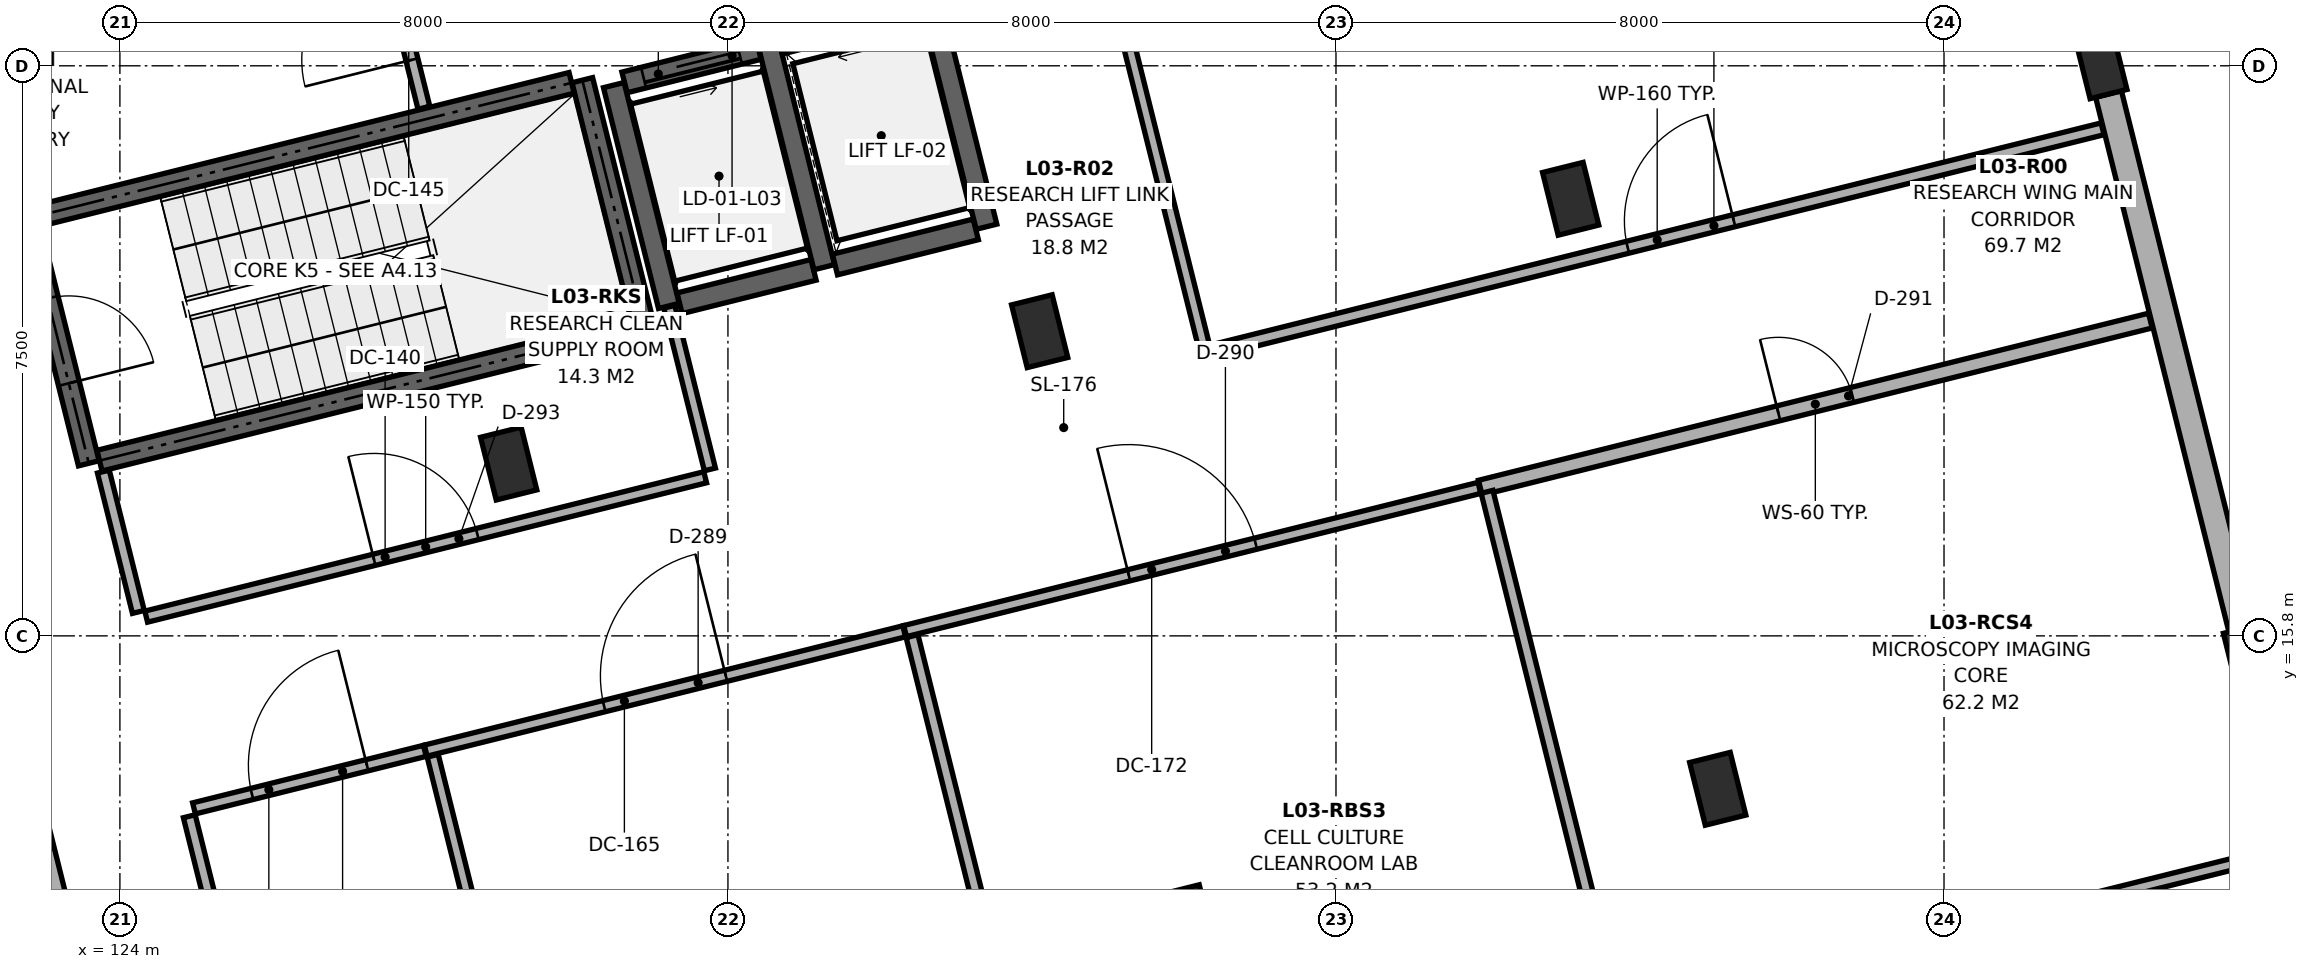
"""IFC4 building model, lengths in metres.
Left out: names, types, materials, properties, quantities, classifications, styles, units other than length and angle.
Written with IfcOpenShell. Run it as: python <this file> out.ifc"""

import sys

from ifc_helpers import new_model, si_unit, direction, frame, frame_2d, origin, origin_2d, place, context, subcontext, project, spatial, rectangle, extrude, element, fill, save


model = new_model("IFC4")
c1 = context("Model", 3, precision=1e-05, world=origin(), true_north=direction((0.0, 1.0)))
c2 = subcontext(c1, "Body", "Model", "MODEL_VIEW")
j1 = project(units=[si_unit("LENGTHUNIT", "METRE"), si_unit("PLANEANGLEUNIT", "RADIAN")], contexts=[c1])
p1 = place(None, origin())
s1 = spatial("IfcSite", under=j1, at=p1, CompositionType="ELEMENT")
p2 = place(p1, origin())
s2 = spatial("IfcBuilding", under=s1, at=p2, CompositionType="ELEMENT")
p3 = place(p2, frame((0.0, 0.0, 13.5)))
s3 = spatial("IfcBuildingStorey", under=s2, at=p3, CompositionType="ELEMENT", Elevation=13.5)
for number, where, z_axis, x_axis in (
    (1, (129.115, 18.067, 0.0), (0.0, 0.0, 1.0), (0.97, 0.242, 0.0)),
    (2, (138.037, 12.046, 0.0), (0.0, 0.0, 1.0), (0.97, 0.242, 0.0)),
    (3, (136.102, 19.808, 0.0), (0.0, 0.0, 1.0), (0.97, 0.242, 0.0)),
    (4, (145.023, 13.788, 0.0), (0.0, 0.0, 1.0), (0.97, 0.242, 0.0)),
    (5, (143.088, 21.55, 0.0), (0.0, 0.0, 1.0), (0.97, 0.242, 0.0)),
):
    element("IfcColumn", number, at=place(p3, frame(where, z_axis=z_axis, x_axis=x_axis)), inside=s3, PredefinedType="COLUMN", context=c2, shape_type="SweptSolid", body=[
        extrude(rectangle(XDim=0.55, YDim=0.85, at=origin_2d()), origin(), (0.0, 0.0, 1.0), 3.72),
    ])
for number, where, z_axis, x_axis in (
    (6, (152.009, 15.53, 0.0), (0.0, 0.0, 1.0), (0.97, 0.242, 0.0)),
    (7, (150.074, 23.292, 0.0), (0.0, 0.0, 1.0), (0.97, 0.242, 0.0)),
):
    element("IfcColumn", number, at=place(p3, frame(where, z_axis=z_axis, x_axis=x_axis)), inside=s3, PredefinedType="COLUMN", context=c2, shape_type="SweptSolid", body=[
        extrude(rectangle(XDim=0.5, YDim=0.75, at=origin_2d()), origin(), (0.0, 0.0, 1.0), 3.75),
    ])
p4 = place(p3, frame((150.165, 22.928, 0.0), z_axis=(0.0, 0.0, 1.0), x_axis=(0.241917549853, -0.970296809782, 0.0)))
e8 = element("IfcWall", 8, at=p4, inside=s3, PredefinedType="SOLIDWALL", context=c2, shape_type="SweptSolid", body=[
    extrude(rectangle(XDim=7.25, YDim=0.35, at=frame_2d((3.625, 0.0))), origin(), (0.0, 0.0, 1.0), 3.005),
])
p5 = place(p3, frame((123.962, 8.975, 0.0), z_axis=(0.0, 0.0, 1.0), x_axis=(-0.241924964772, 0.97029496104, 0.0)))
e9 = element("IfcWall", 9, at=p5, inside=s3, PredefinedType="SOLIDWALL", context=c2, shape_type="SweptSolid", body=[
    extrude(rectangle(XDim=7.15, YDim=0.35, at=frame_2d((3.575, 0.0))), origin(), (0.0, 0.0, 1.0), 3.005),
])
p6 = place(p3, frame((123.731, 18.105, 0.0), z_axis=(0.0, 0.0, 1.0), x_axis=(0.970297238923, 0.241915828623, 0.0)))
e10 = element("IfcWall", 10, at=p6, inside=s3, PredefinedType="SHEAR", context=c2, shape_type="SweptSolid", body=[
    extrude(rectangle(XDim=7.23, YDim=0.28, at=frame_2d((3.615, 0.0))), origin(), (0.0, 0.0, 1.0), 3.72),
])
p7 = place(p3, frame((130.887, 19.889, 0.0), z_axis=(0.0, 0.0, 1.0), x_axis=(-0.241947258837, 0.970289402158, 0.0)))
e11 = element("IfcWall", 11, at=p7, inside=s3, PredefinedType="SHEAR", context=c2, shape_type="SweptSolid", body=[
    extrude(rectangle(XDim=3.32, YDim=0.28, at=frame_2d((1.66, 0.0))), origin(), (0.0, 0.0, 1.0), 3.72),
])
p8 = place(p3, frame((129.943, 23.076, 0.0), z_axis=(0.0, 0.0, 1.0), x_axis=(-0.970289312034, -0.241947620266, 0.0)))
e12 = element("IfcWall", 12, at=p8, inside=s3, PredefinedType="SHEAR", context=c2, shape_type="SweptSolid", body=[
    extrude(rectangle(XDim=7.23, YDim=0.28, at=frame_2d((3.615, 0.0))), origin(), (0.0, 0.0, 1.0), 3.72),
])
p9 = place(p3, frame((122.787, 21.292, 0.0), z_axis=(0.0, 0.0, 1.0), x_axis=(0.241860763027, -0.970310966293, 0.0)))
e13 = element("IfcWall", 13, at=p9, inside=s3, PredefinedType="SHEAR", context=c2, shape_type="SweptSolid", body=[
    extrude(rectangle(XDim=3.32, YDim=0.28, at=frame_2d((1.66, 0.0))), origin(), (0.0, 0.0, 1.0), 3.72),
])
p10 = place(p9, frame((1.085, 0.0, 0.0)))
e14 = element("IfcOpeningElement", 14, at=p10, cuts=e13, PredefinedType="OPENING", context=c2, shape_type="SweptSolid", body=[
    extrude(rectangle(XDim=1.15, YDim=2.15, at=frame_2d((0.575, 1.075))), frame((0.0, 0.152, 0.0), z_axis=(0.0, -1.0, 0.0), x_axis=(1.0, 0.0, 0.0)), (0.0, 0.0, 1.0), 0.304),
])
p11 = place(p3, frame((131.363, 20.176, 0.0), z_axis=(0.0, 0.0, 1.0), x_axis=(0.970284587517, 0.241966566341, 0.0)))
e15 = element("IfcWall", 15, at=p11, inside=s3, PredefinedType="SHEAR", context=c2, shape_type="SweptSolid", body=[
    extrude(rectangle(XDim=1.817, YDim=0.28, at=frame_2d((0.909, 0.0))), origin(), (0.0, 0.0, 1.0), 3.72),
])
p12 = place(p3, frame((133.267, 20.651, 0.0), z_axis=(0.0, 0.0, 1.0), x_axis=(-0.241921647353, 0.970295788171, 0.0)))
e16 = element("IfcWall", 16, at=p12, inside=s3, PredefinedType="SHEAR", context=c2, shape_type="SweptSolid", body=[
    extrude(rectangle(XDim=2.994, YDim=0.28, at=frame_2d((1.497, 0.0))), origin(), (0.0, 0.0, 1.0), 3.72),
])
p13 = place(p3, frame((132.402, 23.521, 0.0), z_axis=(0.0, 0.0, 1.0), x_axis=(-0.970284587517, -0.241966566341, 0.0)))
e17 = element("IfcWall", 17, at=p13, inside=s3, PredefinedType="SHEAR", context=c2, shape_type="SweptSolid", body=[
    extrude(rectangle(XDim=1.817, YDim=0.28, at=frame_2d((0.909, 0.0))), origin(), (0.0, 0.0, 1.0), 3.72),
])
p14 = place(p13, frame((0.259, 0.0, 0.0)))
e18 = element("IfcOpeningElement", 18, at=p14, cuts=e17, PredefinedType="OPENING", context=c2, shape_type="SweptSolid", body=[
    extrude(rectangle(XDim=1.3, YDim=2.2, at=frame_2d((0.65, 1.1))), frame((0.0, 0.152, 0.0), z_axis=(0.0, -1.0, 0.0), x_axis=(1.0, 0.0, 0.0)), (0.0, 0.0, 1.0), 0.304),
])
p15 = place(p3, frame((130.498, 23.046, 0.0), z_axis=(0.0, 0.0, 1.0), x_axis=(0.241921647353, -0.970295788171, 0.0)))
e19 = element("IfcWall", 19, at=p15, inside=s3, PredefinedType="SHEAR", context=c2, shape_type="SweptSolid", body=[
    extrude(rectangle(XDim=2.994, YDim=0.28, at=frame_2d((1.497, 0.0))), origin(), (0.0, 0.0, 1.0), 3.72),
])
p16 = place(p3, frame((133.408, 20.686, 0.0), z_axis=(0.0, 0.0, 1.0), x_axis=(0.970285190026, 0.241964150272, 0.0)))
e20 = element("IfcWall", 20, at=p16, inside=s3, PredefinedType="SHEAR", context=c2, shape_type="SweptSolid", body=[
    extrude(rectangle(XDim=1.91, YDim=0.28, at=frame_2d((0.955, 0.0))), origin(), (0.0, 0.0, 1.0), 3.72),
])
p17 = place(p3, frame((135.402, 21.183, 0.0), z_axis=(0.0, 0.0, 1.0), x_axis=(-0.241921647353, 0.970295788171, 0.0)))
e21 = element("IfcWall", 21, at=p17, inside=s3, PredefinedType="SHEAR", context=c2, shape_type="SweptSolid", body=[
    extrude(rectangle(XDim=2.994, YDim=0.28, at=frame_2d((1.497, 0.0))), origin(), (0.0, 0.0, 1.0), 3.72),
])
p18 = place(p3, frame((134.537, 24.053, 0.0), z_axis=(0.0, 0.0, 1.0), x_axis=(-0.970285190026, -0.241964150272, 0.0)))
e22 = element("IfcWall", 22, at=p18, inside=s3, PredefinedType="SHEAR", context=c2, shape_type="SweptSolid", body=[
    extrude(rectangle(XDim=1.91, YDim=0.28, at=frame_2d((0.955, 0.0))), origin(), (0.0, 0.0, 1.0), 3.72),
])
p19 = place(p18, frame((0.305, 0.0, 0.0)))
e23 = element("IfcOpeningElement", 23, at=p19, cuts=e22, PredefinedType="OPENING", context=c2, shape_type="SweptSolid", body=[
    extrude(rectangle(XDim=1.3, YDim=2.2, at=frame_2d((0.65, 1.1))), frame((0.0, 0.152, 0.0), z_axis=(0.0, -1.0, 0.0), x_axis=(1.0, 0.0, 0.0)), (0.0, 0.0, 1.0), 0.304),
])
p20 = place(p3, frame((124.346, 16.053, 0.0), z_axis=(0.0, 0.0, 1.0), x_axis=(0.970295772287, 0.241921711059, 0.0)))
e24 = element("IfcWall", 24, at=p20, inside=s3, PredefinedType="PARTITIONING", context=c2, shape_type="SweptSolid", body=[
    extrude(rectangle(XDim=7.58, YDim=0.15, at=frame_2d((3.79, 0.0))), origin(), (0.0, 0.0, 1.0), 2.905),
])
p21 = place(p20, frame((3.09, 0.0, 0.0)))
e25 = element("IfcOpeningElement", 25, at=p21, cuts=e24, PredefinedType="OPENING", context=c2, shape_type="SweptSolid", body=[
    extrude(rectangle(XDim=1.4, YDim=2.25, at=frame_2d((0.7, 1.125))), frame((0.0, 0.087, 0.0), z_axis=(0.0, -1.0, 0.0), x_axis=(1.0, 0.0, 0.0)), (0.0, 0.0, 1.0), 0.174),
])
p22 = place(p3, frame((128.0, 22.748, 0.0), z_axis=(0.0, 0.0, 1.0), x_axis=(-0.241929995817, 0.970293706629, 0.0)))
e26 = element("IfcWall", 26, at=p22, inside=s3, PredefinedType="PARTITIONING", context=c2, shape_type="SweptSolid", body=[
    extrude(rectangle(XDim=2.751, YDim=0.16, at=frame_2d((1.375, 0.0))), origin(), (0.0, 0.0, 1.0), 3.7),
])
p23 = place(p22, frame((0.65, 0.0, 0.0)))
e27 = element("IfcOpeningElement", 27, at=p23, cuts=e26, PredefinedType="OPENING", context=c2, shape_type="SweptSolid", body=[
    extrude(rectangle(XDim=1.45, YDim=2.26, at=frame_2d((0.725, 1.13))), frame((0.0, 0.092, 0.0), z_axis=(0.0, -1.0, 0.0), x_axis=(1.0, 0.0, 0.0)), (0.0, 0.0, 1.0), 0.184),
])
p24 = place(p3, frame((124.975, 13.53, 0.0), z_axis=(0.0, 0.0, 1.0), x_axis=(0.970289141252, 0.241948305158, 0.0)))
e28 = element("IfcWall", 28, at=p24, inside=s3, PredefinedType="PARTITIONING", context=c2, shape_type="SweptSolid", body=[
    extrude(rectangle(XDim=3.13, YDim=0.15, at=frame_2d((1.565, 0.0))), origin(), (0.0, 0.0, 1.0), 3.7),
])
p25 = place(p24, frame((0.785, 0.0, 0.0)))
e29 = element("IfcOpeningElement", 29, at=p25, cuts=e28, PredefinedType="OPENING", context=c2, shape_type="SweptSolid", body=[
    extrude(rectangle(XDim=1.56, YDim=2.3, at=frame_2d((0.78, 1.15))), frame((0.0, 0.087, 0.0), z_axis=(0.0, -1.0, 0.0), x_axis=(1.0, 0.0, 0.0)), (0.0, 0.0, 1.0), 0.174),
])
p26 = place(p3, frame((128.023, 14.29, 0.0), z_axis=(0.0, 0.0, 1.0), x_axis=(0.970297244456, 0.24191580643, 0.0)))
e30 = element("IfcWall", 30, at=p26, inside=s3, PredefinedType="PARTITIONING", context=c2, shape_type="SweptSolid", body=[
    extrude(rectangle(XDim=6.488, YDim=0.15, at=frame_2d((3.244, 0.0))), origin(), (0.0, 0.0, 1.0), 2.905),
])
p27 = place(p26, frame((2.419, 0.0, 0.0)))
e31 = element("IfcOpeningElement", 31, at=p27, cuts=e30, PredefinedType="OPENING", context=c2, shape_type="SweptSolid", body=[
    extrude(rectangle(XDim=1.65, YDim=2.32, at=frame_2d((0.825, 1.16))), frame((0.0, 0.087, 0.0), z_axis=(0.0, -1.0, 0.0), x_axis=(1.0, 0.0, 0.0)), (0.0, 0.0, 1.0), 0.174),
])
p28 = place(p3, frame((134.33, 15.863, 0.0), z_axis=(0.0, 0.0, 1.0), x_axis=(0.970299035042, 0.241908624476, 0.0)))
e32 = element("IfcWall", 32, at=p28, inside=s3, PredefinedType="PARTITIONING", context=c2, shape_type="SweptSolid", body=[
    extrude(rectangle(XDim=7.788, YDim=0.15, at=frame_2d((3.894, 0.0))), origin(), (0.0, 0.0, 1.0), 2.905),
])
p29 = place(p28, frame((3.034, 0.0, 0.0)))
e33 = element("IfcOpeningElement", 33, at=p29, cuts=e32, PredefinedType="OPENING", context=c2, shape_type="SweptSolid", body=[
    extrude(rectangle(XDim=1.72, YDim=2.34, at=frame_2d((0.86, 1.17))), frame((0.0, 0.087, 0.0), z_axis=(0.0, -1.0, 0.0), x_axis=(1.0, 0.0, 0.0)), (0.0, 0.0, 1.0), 0.174),
])
p30 = place(p3, frame((141.899, 17.75, 0.0), z_axis=(0.0, 0.0, 1.0), x_axis=(0.970298775858, 0.241909664065, 0.0)))
e34 = element("IfcWall", 34, at=p30, inside=s3, PredefinedType="PARTITIONING", context=c2, shape_type="SweptSolid", body=[
    extrude(rectangle(XDim=9.086, YDim=0.2, at=frame_2d((4.543, 0.0))), origin(), (0.0, 0.0, 1.0), 2.905),
])
p31 = place(p30, frame((4.043, 0.0, 0.0)))
e35 = element("IfcOpeningElement", 35, at=p31, cuts=e34, PredefinedType="OPENING", context=c2, shape_type="SweptSolid", body=[
    extrude(rectangle(XDim=1.0, YDim=2.15, at=frame_2d((0.5, 1.075))), frame((0.0, 0.112, 0.0), z_axis=(0.0, -1.0, 0.0), x_axis=(1.0, 0.0, 0.0)), (0.0, 0.0, 1.0), 0.224),
])
p32 = place(p3, frame((138.367, 19.549, 0.0), z_axis=(0.0, 0.0, 1.0), x_axis=(0.970292133333, 0.241936305651, 0.0)))
e36 = element("IfcWall", 36, at=p32, inside=s3, PredefinedType="PARTITIONING", context=c2, shape_type="SweptSolid", body=[
    extrude(rectangle(XDim=12.078, YDim=0.16, at=frame_2d((6.039, 0.0))), origin(), (0.0, 0.0, 1.0), 2.905),
])
p33 = place(p32, frame((5.638, 0.0, 0.0)))
e37 = element("IfcOpeningElement", 37, at=p33, cuts=e36, PredefinedType="OPENING", context=c2, shape_type="SweptSolid", body=[
    extrude(rectangle(XDim=1.44, YDim=2.32, at=frame_2d((0.72, 1.16))), frame((0.0, 0.092, 0.0), z_axis=(0.0, -1.0, 0.0), x_axis=(1.0, 0.0, 0.0)), (0.0, 0.0, 1.0), 0.184),
])
p34 = place(p3, frame((124.243, 16.115, 0.0), z_axis=(0.0, 0.0, 1.0), x_axis=(-0.241962034071, 0.970285717749, 0.0)))
e38 = element("IfcWall", 38, at=p34, inside=s3, PredefinedType="PARTITIONING", context=c2, shape_type="SweptSolid", body=[
    extrude(rectangle(XDim=1.903, YDim=0.16, at=frame_2d((0.952, 0.0))), origin(), (0.0, 0.0, 1.0), 3.005),
])
p35 = place(p3, frame((131.763, 17.99, 0.0), z_axis=(0.0, 0.0, 1.0), x_axis=(-0.241962612769, 0.970285573438, 0.0)))
e39 = element("IfcWall", 39, at=p35, inside=s3, PredefinedType="PARTITIONING", context=c2, shape_type="SweptSolid", body=[
    extrude(rectangle(XDim=2.206, YDim=0.15, at=frame_2d((1.103, 0.0))), origin(), (0.0, 0.0, 1.0), 3.005),
])
p36 = place(p3, frame((126.607, 6.632, 0.0), z_axis=(0.0, 0.0, 1.0), x_axis=(-0.241944970231, 0.970289972833, 0.0)))
e40 = element("IfcWall", 40, at=p36, inside=s3, PredefinedType="PARTITIONING", context=c2, shape_type="SweptSolid", body=[
    extrude(rectangle(XDim=7.003, YDim=0.16, at=frame_2d((3.501, 0.0))), origin(), (0.0, 0.0, 1.0), 3.005),
])
p37 = place(p3, frame((129.809, 7.43, 0.0), z_axis=(0.0, 0.0, 1.0), x_axis=(-0.241911968874, 0.970298201233, 0.0)))
e41 = element("IfcWall", 41, at=p37, inside=s3, PredefinedType="PARTITIONING", context=c2, shape_type="SweptSolid", body=[
    extrude(rectangle(XDim=7.001, YDim=0.15, at=frame_2d((3.5, 0.0))), origin(), (0.0, 0.0, 1.0), 3.005),
])
p38 = place(p3, frame((136.122, 8.979, 0.0), z_axis=(0.0, 0.0, 1.0), x_axis=(-0.241922359391, 0.97029561064, 0.0)))
e42 = element("IfcWall", 42, at=p38, inside=s3, PredefinedType="PARTITIONING", context=c2, shape_type="SweptSolid", body=[
    extrude(rectangle(XDim=7.026, YDim=0.16, at=frame_2d((3.513, 0.0))), origin(), (0.0, 0.0, 1.0), 3.005),
])
p39 = place(p3, frame((143.691, 10.864, 0.0), z_axis=(0.0, 0.0, 1.0), x_axis=(-0.241939954485, 0.970291223512, 0.0)))
e43 = element("IfcWall", 43, at=p39, inside=s3, PredefinedType="PARTITIONING", context=c2, shape_type="SweptSolid", body=[
    extrude(rectangle(XDim=7.041, YDim=0.16, at=frame_2d((3.52, 0.0))), origin(), (0.0, 0.0, 1.0), 3.005),
])
p40 = place(p3, frame((143.641, 10.764, 0.0), z_axis=(0.0, 0.0, 1.0), x_axis=(0.970298775858, 0.241909664065, 0.0)))
e44 = element("IfcWall", 44, at=p40, inside=s3, PredefinedType="PARTITIONING", context=c2, shape_type="SweptSolid", body=[
    extrude(rectangle(XDim=9.086, YDim=0.15, at=frame_2d((4.543, 0.0))), origin(), (0.0, 0.0, 1.0), 2.905),
])
p41 = place(p3, frame((138.264, 19.611, 0.0), z_axis=(0.0, 0.0, 1.0), x_axis=(-0.241920353256, 0.970296110824, 0.0)))
e45 = element("IfcWall", 45, at=p41, inside=s3, PredefinedType="PARTITIONING", context=c2, shape_type="SweptSolid", body=[
    extrude(rectangle(XDim=8.03, YDim=0.15, at=frame_2d((4.015, 0.0))), origin(), (0.0, 0.0, 1.0), 3.005),
])
p42 = place(p10, origin())
e46 = element("IfcDoor", 46, at=p42, inside=s3, OperationType="SINGLE_SWING_RIGHT", PredefinedType="DOOR", context=c2, shape_type="SweptSolid", body=[
    extrude(rectangle(XDim=1.15, YDim=2.15, at=frame_2d((0.575, 1.075))), frame((0.0, 0.025, 0.0), z_axis=(0.0, -1.0, 0.0), x_axis=(1.0, 0.0, 0.0)), (0.0, 0.0, 1.0), 0.05),
])
fill(e14, e46)
p43 = place(p14, origin())
e47 = element("IfcDoor", 47, at=p43, inside=s3, OperationType="SLIDING_TO_LEFT", PredefinedType="DOOR", context=c2, shape_type="SweptSolid", body=[
    extrude(rectangle(XDim=1.3, YDim=2.2, at=frame_2d((0.65, 1.1))), frame((0.0, 0.025, 0.0), z_axis=(0.0, -1.0, 0.0), x_axis=(1.0, 0.0, 0.0)), (0.0, 0.0, 1.0), 0.05),
])
fill(e18, e47)
p44 = place(p21, origin())
e48 = element("IfcDoor", 48, at=p44, inside=s3, OperationType="SINGLE_SWING_LEFT", PredefinedType="DOOR", context=c2, shape_type="SweptSolid", body=[
    extrude(rectangle(XDim=1.4, YDim=2.25, at=frame_2d((0.7, 1.125))), frame((0.0, 0.025, 0.0), z_axis=(0.0, -1.0, 0.0), x_axis=(1.0, 0.0, 0.0)), (0.0, 0.0, 1.0), 0.05),
])
fill(e25, e48)
p45 = place(p23, origin())
e49 = element("IfcDoor", 49, at=p45, inside=s3, OperationType="SINGLE_SWING_LEFT", PredefinedType="DOOR", context=c2, shape_type="SweptSolid", body=[
    extrude(rectangle(XDim=1.45, YDim=2.26, at=frame_2d((0.725, 1.13))), frame((0.0, 0.025, 0.0), z_axis=(0.0, -1.0, 0.0), x_axis=(1.0, 0.0, 0.0)), (0.0, 0.0, 1.0), 0.05),
])
fill(e27, e49)
p46 = place(p25, origin())
e50 = element("IfcDoor", 50, at=p46, inside=s3, OperationType="SINGLE_SWING_RIGHT", PredefinedType="DOOR", context=c2, shape_type="SweptSolid", body=[
    extrude(rectangle(XDim=1.56, YDim=2.3, at=frame_2d((0.78, 1.15))), frame((0.0, 0.025, 0.0), z_axis=(0.0, -1.0, 0.0), x_axis=(1.0, 0.0, 0.0)), (0.0, 0.0, 1.0), 0.05),
])
fill(e29, e50)
p47 = place(p27, origin())
e51 = element("IfcDoor", 51, at=p47, inside=s3, OperationType="SINGLE_SWING_RIGHT", PredefinedType="DOOR", context=c2, shape_type="SweptSolid", body=[
    extrude(rectangle(XDim=1.65, YDim=2.32, at=frame_2d((0.825, 1.16))), frame((0.0, 0.025, 0.0), z_axis=(0.0, -1.0, 0.0), x_axis=(1.0, 0.0, 0.0)), (0.0, 0.0, 1.0), 0.05),
])
fill(e31, e51)
p48 = place(p29, origin())
e52 = element("IfcDoor", 52, at=p48, inside=s3, OperationType="SINGLE_SWING_LEFT", PredefinedType="DOOR", context=c2, shape_type="SweptSolid", body=[
    extrude(rectangle(XDim=1.72, YDim=2.34, at=frame_2d((0.86, 1.17))), frame((0.0, 0.025, 0.0), z_axis=(0.0, -1.0, 0.0), x_axis=(1.0, 0.0, 0.0)), (0.0, 0.0, 1.0), 0.05),
])
fill(e33, e52)
p49 = place(p31, origin())
e53 = element("IfcDoor", 53, at=p49, inside=s3, OperationType="SINGLE_SWING_LEFT", PredefinedType="DOOR", context=c2, shape_type="SweptSolid", body=[
    extrude(rectangle(XDim=1.0, YDim=2.15, at=frame_2d((0.5, 1.075))), frame((0.0, 0.025, 0.0), z_axis=(0.0, -1.0, 0.0), x_axis=(1.0, 0.0, 0.0)), (0.0, 0.0, 1.0), 0.05),
])
fill(e35, e53)
p50 = place(p33, origin())
e54 = element("IfcDoor", 54, at=p50, inside=s3, OperationType="SINGLE_SWING_RIGHT", PredefinedType="DOOR", context=c2, shape_type="SweptSolid", body=[
    extrude(rectangle(XDim=1.44, YDim=2.32, at=frame_2d((0.72, 1.16))), frame((0.0, 0.025, 0.0), z_axis=(0.0, -1.0, 0.0), x_axis=(1.0, 0.0, 0.0)), (0.0, 0.0, 1.0), 0.05),
])
fill(e37, e54)
save(model, sys.argv[1])
